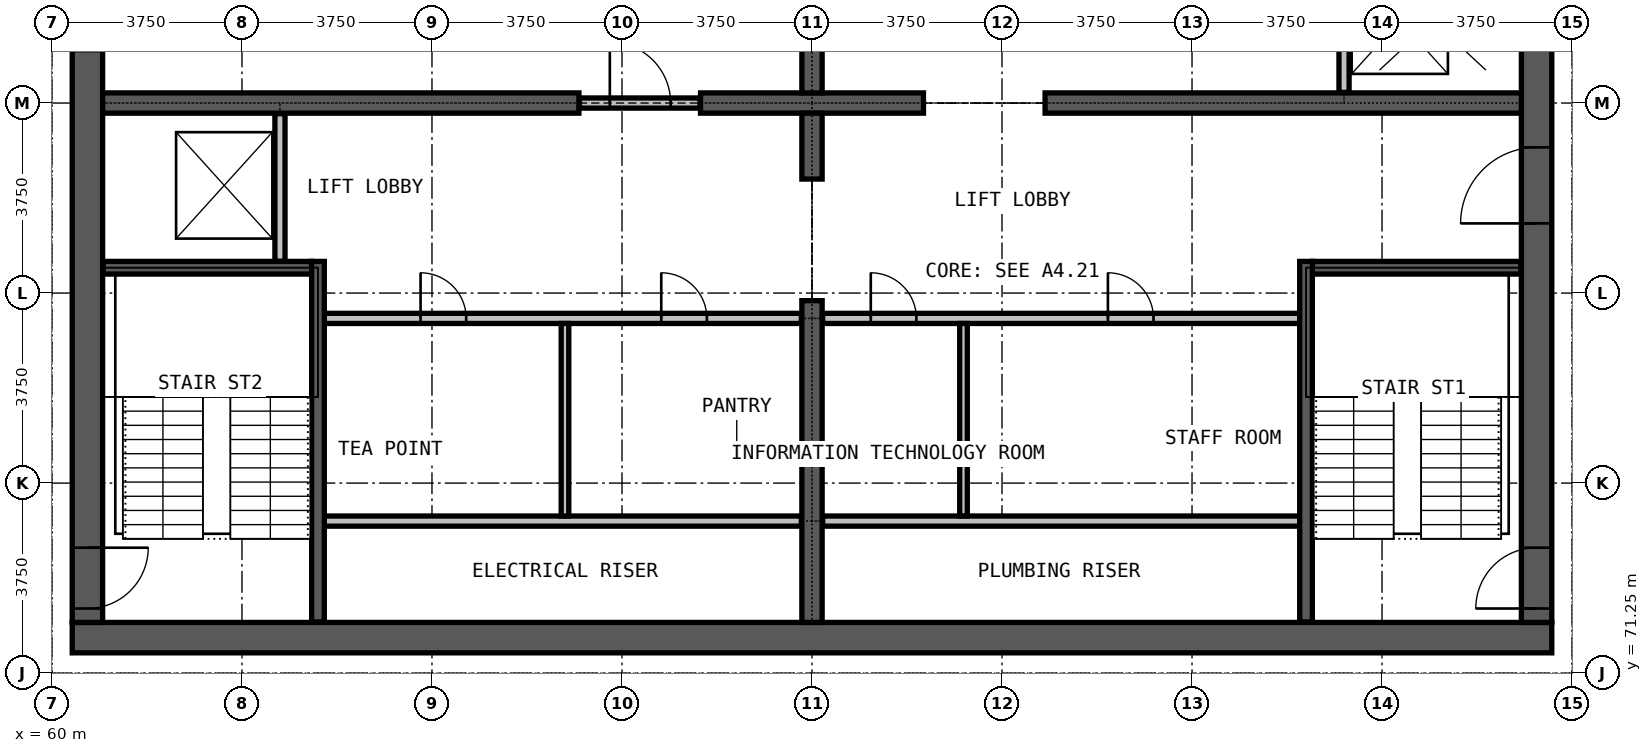
"""IFC4 building model, lengths in metres.
Left out: names, types, materials, properties, quantities, classifications, styles, units other than length and angle.
Written with IfcOpenShell. Run it as: python <this file> out.ifc"""

import sys

from ifc_helpers import new_model, si_unit, direction, frame, frame_2d, origin, place, context, subcontext, project, spatial, rectangle, extrude, element, fill, save


model = new_model("IFC4")
c1 = context("Model", 3, precision=1e-05, world=origin(), true_north=direction((0.0, 1.0)))
c2 = subcontext(c1, "Body", "Model", "MODEL_VIEW")
j1 = project(units=[si_unit("LENGTHUNIT", "METRE"), si_unit("PLANEANGLEUNIT", "RADIAN")], contexts=[c1])
p1 = place(None, origin())
s1 = spatial("IfcSite", under=j1, at=p1, CompositionType="ELEMENT")
p2 = place(p1, origin())
s2 = spatial("IfcBuilding", under=s1, at=p2, CompositionType="ELEMENT")
p3 = place(p2, frame((0.0, 0.0, 203.1)))
s3 = spatial("IfcBuildingStorey", under=s2, at=p3, CompositionType="ELEMENT", Elevation=203.1)
p4 = place(p3, frame((60.4, 71.95, 0.0), z_axis=(0.0, 0.0, 1.0), x_axis=(1.0, 0.0, 0.0)))
e1 = element("IfcWall", 1, at=p4, inside=s3, PredefinedType="SHEAR", context=c2, shape_type="SweptSolid", body=[
    extrude(rectangle(XDim=29.2, YDim=0.6, at=frame_2d((14.6, 0.0))), origin(), (0.0, 0.0, 1.0), 3.6),
])
p5 = place(p3, frame((89.3, 72.25, 0.0), z_axis=(0.0, 0.0, 1.0), x_axis=(0.0, 1.0, 0.0)))
e2 = element("IfcWall", 2, at=p5, inside=s3, PredefinedType="SHEAR", context=c2, shape_type="SweptSolid", body=[
    extrude(rectangle(XDim=20.5, YDim=0.6, at=frame_2d((10.25, 0.0))), origin(), (0.0, 0.0, 1.0), 3.6),
])
p6 = place(p5, frame((0.275, 0.0, 0.0)))
e3 = element("IfcOpeningElement", 3, at=p6, cuts=e2, PredefinedType="OPENING", context=c2, shape_type="SweptSolid", body=[
    extrude(rectangle(XDim=1.2, YDim=2.2, at=frame_2d((0.6, 1.1))), frame((0.0, 0.31, 0.0), z_axis=(0.0, -1.0, 0.0), x_axis=(1.0, 0.0, 0.0)), (0.0, 0.0, 1.0), 0.62),
])
p7 = place(p5, frame((13.775, 0.0, 0.0)))
e4 = element("IfcOpeningElement", 4, at=p7, cuts=e2, PredefinedType="OPENING", context=c2, shape_type="SweptSolid", body=[
    extrude(rectangle(XDim=1.2, YDim=2.2, at=frame_2d((0.6, 1.1))), frame((0.0, 0.31, 0.0), z_axis=(0.0, -1.0, 0.0), x_axis=(1.0, 0.0, 0.0)), (0.0, 0.0, 1.0), 0.62),
])
p8 = place(p5, frame((7.875, 0.0, 0.0)))
e5 = element("IfcOpeningElement", 5, at=p8, cuts=e2, PredefinedType="OPENING", context=c2, shape_type="SweptSolid", body=[
    extrude(rectangle(XDim=1.5, YDim=2.2, at=frame_2d((0.75, 1.1))), frame((0.0, 0.31, 0.0), z_axis=(0.0, -1.0, 0.0), x_axis=(1.0, 0.0, 0.0)), (0.0, 0.0, 1.0), 0.62),
])
p9 = place(p3, frame((60.7, 92.75, 0.0), z_axis=(0.0, 0.0, 1.0), x_axis=(0.0, -1.0, 0.0)))
e6 = element("IfcWall", 6, at=p9, inside=s3, PredefinedType="SHEAR", context=c2, shape_type="SweptSolid", body=[
    extrude(rectangle(XDim=20.5, YDim=0.6, at=frame_2d((10.25, 0.0))), origin(), (0.0, 0.0, 1.0), 3.6),
])
p10 = place(p9, frame((19.025, 0.0, 0.0)))
e7 = element("IfcOpeningElement", 7, at=p10, cuts=e6, PredefinedType="OPENING", context=c2, shape_type="SweptSolid", body=[
    extrude(rectangle(XDim=1.2, YDim=2.2, at=frame_2d((0.6, 1.1))), frame((0.0, 0.31, 0.0), z_axis=(0.0, -1.0, 0.0), x_axis=(1.0, 0.0, 0.0)), (0.0, 0.0, 1.0), 0.62),
])
p11 = place(p9, frame((8.025, 0.0, 0.0)))
e8 = element("IfcOpeningElement", 8, at=p11, cuts=e6, PredefinedType="OPENING", context=c2, shape_type="SweptSolid", body=[
    extrude(rectangle(XDim=1.2, YDim=2.2, at=frame_2d((0.6, 1.1))), frame((0.0, 0.31, 0.0), z_axis=(0.0, -1.0, 0.0), x_axis=(1.0, 0.0, 0.0)), (0.0, 0.0, 1.0), 0.62),
])
p12 = place(p3, frame((61.0, 82.5, 0.0), z_axis=(0.0, 0.0, 1.0), x_axis=(1.0, 0.0, 0.0)))
e9 = element("IfcWall", 9, at=p12, inside=s3, PredefinedType="SHEAR", context=c2, shape_type="SweptSolid", body=[
    extrude(rectangle(XDim=9.4, YDim=0.4, at=frame_2d((4.7, 0.0))), origin(), (0.0, 0.0, 1.0), 3.6),
])
p13 = place(p3, frame((72.8, 82.5, 0.0), z_axis=(0.0, 0.0, 1.0), x_axis=(1.0, 0.0, 0.0)))
e10 = element("IfcWall", 10, at=p13, inside=s3, PredefinedType="SHEAR", context=c2, shape_type="SweptSolid", body=[
    extrude(rectangle(XDim=4.4, YDim=0.4, at=frame_2d((2.2, 0.0))), origin(), (0.0, 0.0, 1.0), 3.6),
])
p14 = place(p3, frame((79.6, 82.5, 0.0), z_axis=(0.0, 0.0, 1.0), x_axis=(1.0, 0.0, 0.0)))
e11 = element("IfcWall", 11, at=p14, inside=s3, PredefinedType="SHEAR", context=c2, shape_type="SweptSolid", body=[
    extrude(rectangle(XDim=9.4, YDim=0.4, at=frame_2d((4.7, 0.0))), origin(), (0.0, 0.0, 1.0), 3.6),
])
p15 = place(p3, frame((75.0, 72.25, 0.0), z_axis=(0.0, 0.0, 1.0), x_axis=(0.0, 1.0, 0.0)))
e12 = element("IfcWall", 12, at=p15, inside=s3, PredefinedType="SHEAR", context=c2, shape_type="SweptSolid", body=[
    extrude(rectangle(XDim=6.35, YDim=0.4, at=frame_2d((3.175, 0.0))), origin(), (0.0, 0.0, 1.0), 3.6),
])
for number, where, z_axis, x_axis in (
    (13, (75.0, 81.0, 0.0), (0.0, 0.0, 1.0), (0.0, 1.0, 0.0)),
    (14, (75.0, 82.7, 0.0), (0.0, 0.0, 1.0), (0.0, 1.0, 0.0)),
):
    element("IfcWall", number, at=place(p3, frame(where, z_axis=z_axis, x_axis=x_axis)), inside=s3, PredefinedType="SHEAR", context=c2, shape_type="SweptSolid", body=[
        extrude(rectangle(XDim=1.3, YDim=0.4, at=frame_2d((0.65, 0.0))), origin(), (0.0, 0.0, 1.0), 3.6),
    ])
for number, where, z_axis, x_axis in (
    (15, (65.375, 74.25, 0.0), (0.0, 0.0, 1.0), (1.0, 0.0, 0.0)),
    (16, (75.21, 74.25, 0.0), (0.0, 0.0, 1.0), (1.0, 0.0, 0.0)),
):
    element("IfcWall", number, at=place(p3, frame(where, z_axis=z_axis, x_axis=x_axis)), inside=s3, PredefinedType="PARTITIONING", context=c2, shape_type="SweptSolid", body=[
        extrude(rectangle(XDim=9.415, YDim=0.2, at=frame_2d((4.708, 0.0))), origin(), (0.0, 0.0, 1.0), 3.3),
    ])
p16 = place(p3, frame((65.375, 78.25, 0.0), z_axis=(0.0, 0.0, 1.0), x_axis=(1.0, 0.0, 0.0)))
e17 = element("IfcWall", 17, at=p16, inside=s3, PredefinedType="PARTITIONING", context=c2, shape_type="SweptSolid", body=[
    extrude(rectangle(XDim=9.415, YDim=0.2, at=frame_2d((4.708, 0.0))), origin(), (0.0, 0.0, 1.0), 3.3),
])
p17 = place(p16, frame((1.9, 0.0, 0.0)))
e18 = element("IfcOpeningElement", 18, at=p17, cuts=e17, PredefinedType="OPENING", context=c2, shape_type="SweptSolid", body=[
    extrude(rectangle(XDim=0.9, YDim=2.2, at=frame_2d((0.45, 1.1))), frame((0.0, 0.11, 0.0), z_axis=(0.0, -1.0, 0.0), x_axis=(1.0, 0.0, 0.0)), (0.0, 0.0, 1.0), 0.22),
])
p18 = place(p16, frame((6.65, 0.0, 0.0)))
e19 = element("IfcOpeningElement", 19, at=p18, cuts=e17, PredefinedType="OPENING", context=c2, shape_type="SweptSolid", body=[
    extrude(rectangle(XDim=0.9, YDim=2.2, at=frame_2d((0.45, 1.1))), frame((0.0, 0.11, 0.0), z_axis=(0.0, -1.0, 0.0), x_axis=(1.0, 0.0, 0.0)), (0.0, 0.0, 1.0), 0.22),
])
p19 = place(p3, frame((75.21, 78.25, 0.0), z_axis=(0.0, 0.0, 1.0), x_axis=(1.0, 0.0, 0.0)))
e20 = element("IfcWall", 20, at=p19, inside=s3, PredefinedType="PARTITIONING", context=c2, shape_type="SweptSolid", body=[
    extrude(rectangle(XDim=9.415, YDim=0.2, at=frame_2d((4.708, 0.0))), origin(), (0.0, 0.0, 1.0), 3.3),
])
p20 = place(p19, frame((0.95, 0.0, 0.0)))
e21 = element("IfcOpeningElement", 21, at=p20, cuts=e20, PredefinedType="OPENING", context=c2, shape_type="SweptSolid", body=[
    extrude(rectangle(XDim=0.9, YDim=2.2, at=frame_2d((0.45, 1.1))), frame((0.0, 0.11, 0.0), z_axis=(0.0, -1.0, 0.0), x_axis=(1.0, 0.0, 0.0)), (0.0, 0.0, 1.0), 0.22),
])
p21 = place(p19, frame((5.63, 0.0, 0.0)))
e22 = element("IfcOpeningElement", 22, at=p21, cuts=e20, PredefinedType="OPENING", context=c2, shape_type="SweptSolid", body=[
    extrude(rectangle(XDim=0.9, YDim=2.2, at=frame_2d((0.45, 1.1))), frame((0.0, 0.11, 0.0), z_axis=(0.0, -1.0, 0.0), x_axis=(1.0, 0.0, 0.0)), (0.0, 0.0, 1.0), 0.22),
])
p22 = place(p3, frame((70.41, 82.5, 0.0), z_axis=(0.0, 0.0, 1.0), x_axis=(1.0, 0.0, 0.0)))
e23 = element("IfcWall", 23, at=p22, inside=s3, PredefinedType="PARTITIONING", context=c2, shape_type="SweptSolid", body=[
    extrude(rectangle(XDim=2.38, YDim=0.2, at=frame_2d((1.19, 0.0))), origin(), (0.0, 0.0, 1.0), 2.4),
])
p23 = place(p22, frame((0.6, 0.0, 0.0)))
e24 = element("IfcOpeningElement", 24, at=p23, cuts=e23, PredefinedType="OPENING", context=c2, shape_type="SweptSolid", body=[
    extrude(rectangle(XDim=1.2, YDim=2.2, at=frame_2d((0.6, 1.1))), frame((0.0, 0.11, 0.0), z_axis=(0.0, -1.0, 0.0), x_axis=(1.0, 0.0, 0.0)), (0.0, 0.0, 1.0), 0.22),
])
for number, where, z_axis, x_axis in (
    (25, (70.125, 74.35, 0.0), (0.0, 0.0, 1.0), (0.0, 1.0, 0.0)),
    (26, (77.99, 74.35, 0.0), (0.0, 0.0, 1.0), (0.0, 1.0, 0.0)),
):
    element("IfcWall", number, at=place(p3, frame(where, z_axis=z_axis, x_axis=x_axis)), inside=s3, PredefinedType="PARTITIONING", context=c2, shape_type="SweptSolid", body=[
        extrude(rectangle(XDim=3.8, YDim=0.15, at=frame_2d((1.9, 0.0))), origin(), (0.0, 0.0, 1.0), 3.3),
    ])
p24 = place(p3, frame((64.5, 79.375, 0.0), z_axis=(0.0, 0.0, 1.0), x_axis=(0.0, 1.0, 0.0)))
e27 = element("IfcWall", 27, at=p24, inside=s3, PredefinedType="PARTITIONING", context=c2, shape_type="SweptSolid", body=[
    extrude(rectangle(XDim=2.915, YDim=0.2, at=frame_2d((1.458, 0.0))), origin(), (0.0, 0.0, 1.0), 3.3),
])
p25 = place(p3, frame((85.5, 82.71, 0.0), z_axis=(0.0, 0.0, 1.0), x_axis=(0.0, 1.0, 0.0)))
e28 = element("IfcWall", 28, at=p25, inside=s3, PredefinedType="PARTITIONING", context=c2, shape_type="SweptSolid", body=[
    extrude(rectangle(XDim=2.915, YDim=0.2, at=frame_2d((1.458, 0.0))), origin(), (0.0, 0.0, 1.0), 3.3),
])
p26 = place(p25, frame((0.9, 0.0, 0.0)))
e29 = element("IfcOpeningElement", 29, at=p26, cuts=e28, PredefinedType="OPENING", context=c2, shape_type="SweptSolid", body=[
    extrude(rectangle(XDim=1.1, YDim=2.2, at=frame_2d((0.55, 1.1))), frame((0.0, 0.11, 0.0), z_axis=(0.0, -1.0, 0.0), x_axis=(1.0, 0.0, 0.0)), (0.0, 0.0, 1.0), 0.22),
])
for number, where, z_axis, x_axis in (
    (30, (61.01, 79.25, 0.0), (0.0, 0.0, 1.0), (1.0, 0.0, 0.0)),
    (31, (84.875, 79.25, 0.0), (0.0, 0.0, 1.0), (1.0, 0.0, 0.0)),
):
    element("IfcWall", number, at=place(p3, frame(where, z_axis=z_axis, x_axis=x_axis)), inside=s3, PredefinedType="PARTITIONING", context=c2, shape_type="SweptSolid", body=[
        extrude(rectangle(XDim=4.115, YDim=0.25, at=frame_2d((2.058, 0.0))), origin(), (0.0, 0.0, 1.0), 3.3),
    ])
for number, where, z_axis, x_axis in (
    (32, (65.25, 72.26, 0.0), (0.0, 0.0, 1.0), (0.0, 1.0, 0.0)),
    (33, (84.75, 72.26, 0.0), (0.0, 0.0, 1.0), (0.0, 1.0, 0.0)),
):
    element("IfcWall", number, at=place(p3, frame(where, z_axis=z_axis, x_axis=x_axis)), inside=s3, PredefinedType="PARTITIONING", context=c2, shape_type="SweptSolid", body=[
        extrude(rectangle(XDim=7.115, YDim=0.25, at=frame_2d((3.558, 0.0))), origin(), (0.0, 0.0, 1.0), 3.3),
    ])
p27 = place(p23, origin())
e34 = element("IfcDoor", 34, at=p27, inside=s3, OperationType="SINGLE_SWING_LEFT", PredefinedType="DOOR", context=c2, shape_type="SweptSolid", body=[
    extrude(rectangle(XDim=1.2, YDim=2.2, at=frame_2d((0.6, 1.1))), frame((0.0, 0.025, 0.0), z_axis=(0.0, -1.0, 0.0), x_axis=(1.0, 0.0, 0.0)), (0.0, 0.0, 1.0), 0.05),
])
fill(e24, e34)
p28 = place(p6, origin())
e35 = element("IfcDoor", 35, at=p28, inside=s3, OperationType="SINGLE_SWING_RIGHT", PredefinedType="DOOR", context=c2, shape_type="SweptSolid", body=[
    extrude(rectangle(XDim=1.2, YDim=2.2, at=frame_2d((0.6, 1.1))), frame((0.0, 0.025, 0.0), z_axis=(0.0, -1.0, 0.0), x_axis=(1.0, 0.0, 0.0)), (0.0, 0.0, 1.0), 0.05),
])
fill(e3, e35)
p29 = place(p10, origin())
e36 = element("IfcDoor", 36, at=p29, inside=s3, OperationType="SINGLE_SWING_LEFT", PredefinedType="DOOR", context=c2, shape_type="SweptSolid", body=[
    extrude(rectangle(XDim=1.2, YDim=2.2, at=frame_2d((0.6, 1.1))), frame((0.0, 0.025, 0.0), z_axis=(0.0, -1.0, 0.0), x_axis=(1.0, 0.0, 0.0)), (0.0, 0.0, 1.0), 0.05),
])
fill(e7, e36)
p30 = place(p8, origin())
e37 = element("IfcDoor", 37, at=p30, inside=s3, OperationType="DOUBLE_DOOR_SINGLE_SWING", PredefinedType="DOOR", context=c2, shape_type="SweptSolid", body=[
    extrude(rectangle(XDim=1.5, YDim=2.2, at=frame_2d((0.75, 1.1))), frame((0.0, 0.025, 0.0), z_axis=(0.0, -1.0, 0.0), x_axis=(1.0, 0.0, 0.0)), (0.0, 0.0, 1.0), 0.05),
])
fill(e5, e37)
p31 = place(p17, origin())
e38 = element("IfcDoor", 38, at=p31, inside=s3, OperationType="SINGLE_SWING_LEFT", PredefinedType="DOOR", context=c2, shape_type="SweptSolid", body=[
    extrude(rectangle(XDim=0.9, YDim=2.2, at=frame_2d((0.45, 1.1))), frame((0.0, 0.025, 0.0), z_axis=(0.0, -1.0, 0.0), x_axis=(1.0, 0.0, 0.0)), (0.0, 0.0, 1.0), 0.05),
])
fill(e18, e38)
p32 = place(p18, origin())
e39 = element("IfcDoor", 39, at=p32, inside=s3, OperationType="SINGLE_SWING_LEFT", PredefinedType="DOOR", context=c2, shape_type="SweptSolid", body=[
    extrude(rectangle(XDim=0.9, YDim=2.2, at=frame_2d((0.45, 1.1))), frame((0.0, 0.025, 0.0), z_axis=(0.0, -1.0, 0.0), x_axis=(1.0, 0.0, 0.0)), (0.0, 0.0, 1.0), 0.05),
])
fill(e19, e39)
p33 = place(p20, origin())
e40 = element("IfcDoor", 40, at=p33, inside=s3, OperationType="SINGLE_SWING_LEFT", PredefinedType="DOOR", context=c2, shape_type="SweptSolid", body=[
    extrude(rectangle(XDim=0.9, YDim=2.2, at=frame_2d((0.45, 1.1))), frame((0.0, 0.025, 0.0), z_axis=(0.0, -1.0, 0.0), x_axis=(1.0, 0.0, 0.0)), (0.0, 0.0, 1.0), 0.05),
])
fill(e21, e40)
p34 = place(p21, origin())
e41 = element("IfcDoor", 41, at=p34, inside=s3, OperationType="SINGLE_SWING_LEFT", PredefinedType="DOOR", context=c2, shape_type="SweptSolid", body=[
    extrude(rectangle(XDim=0.9, YDim=2.2, at=frame_2d((0.45, 1.1))), frame((0.0, 0.025, 0.0), z_axis=(0.0, -1.0, 0.0), x_axis=(1.0, 0.0, 0.0)), (0.0, 0.0, 1.0), 0.05),
])
fill(e22, e41)
save(model, sys.argv[1])
